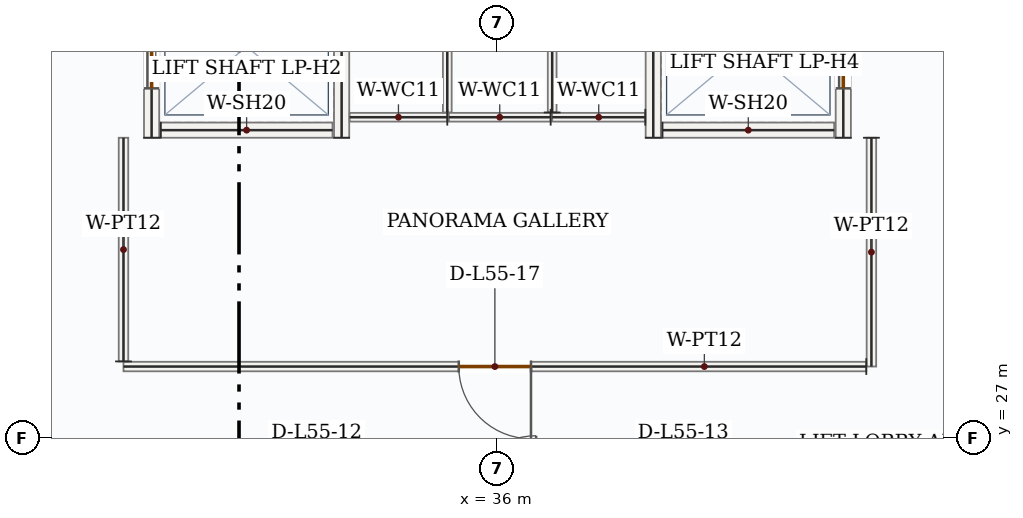
"""IFC4 building model, lengths in metres.
Left out: names, types, materials, properties, quantities, classifications, styles, units other than length and angle.
Written with IfcOpenShell. Run it as: python <this file> out.ifc"""

import sys

from ifc_helpers import new_model, si_unit, direction, frame, frame_2d, origin, place, context, subcontext, project, spatial, rectangle, extrude, source, transform, mapped, element, fill, save


model = new_model("IFC4")
c1 = context("Model", 3, precision=1e-05, world=origin(), true_north=direction((0.0, 1.0)))
c2 = subcontext(c1, "Body", "Model", "MODEL_VIEW")
j1 = project(units=[si_unit("LENGTHUNIT", "METRE"), si_unit("PLANEANGLEUNIT", "RADIAN")], contexts=[c1])
p1 = place(None, origin())
s1 = spatial("IfcSite", under=j1, at=p1, CompositionType="ELEMENT")
p2 = place(p1, origin())
s2 = spatial("IfcBuilding", under=s1, at=p2, CompositionType="ELEMENT")
p3 = place(p2, frame((0.0, 0.0, 234.3)))
s3 = spatial("IfcBuildingStorey", under=s2, at=p3, CompositionType="ELEMENT", Elevation=234.3)
p4 = place(p3, frame((31.45, 30.95, 0.0), z_axis=(0.0, 0.0, 1.0), x_axis=(0.0, 1.0, 0.0)))
e1 = element("IfcWall", 1, at=p4, inside=s3, PredefinedType="SOLIDWALL", context=c2, shape_type="SweptSolid", body=[
    extrude(rectangle(XDim=2.4, YDim=0.2, at=frame_2d((1.2, 0.0))), origin(), (0.0, 0.0, 1.0), 4.55),
])
p5 = place(p4, frame((0.65, 0.0, 0.0)))
e2 = element("IfcOpeningElement", 2, at=p5, cuts=e1, PredefinedType="OPENING", context=c2, shape_type="SweptSolid", body=[
    extrude(rectangle(XDim=1.1, YDim=2.15, at=frame_2d((0.55, 1.075))), frame((0.0, 0.11, 0.0), z_axis=(0.0, -1.0, 0.0), x_axis=(1.0, 0.0, 0.0)), (0.0, 0.0, 1.0), 0.22),
])
m1 = source(origin(), c2, "Body", "SweptSolid", [
    extrude(rectangle(XDim=2.4, YDim=0.2, at=frame_2d((1.2, 0.0))), origin(), (0.0, 0.0, 1.0), 4.55),
])
p6 = place(p3, frame((33.95, 30.95, 0.0), z_axis=(0.0, 0.0, 1.0), x_axis=(0.0, 1.0, 0.0)))
e3 = element("IfcWall", 3, at=p6, inside=s3, PredefinedType="SOLIDWALL", context=c2, shape_type="MappedRepresentation", body=[
    mapped(m1, transform((0.0, 0.0, 0.0), x_axis=(1.0, 0.0, 0.0), y_axis=(0.0, 1.0, 0.0), z_axis=(0.0, 0.0, 1.0), scale=1.0)),
])
m2 = source(origin(), c2, "Body", "SweptSolid", [
    extrude(rectangle(XDim=2.26, YDim=0.2, at=frame_2d((1.13, 0.0))), origin(), (0.0, 0.0, 1.0), 4.55),
])
p7 = place(p3, frame((31.57, 31.05, 0.0), z_axis=(0.0, 0.0, 1.0), x_axis=(1.0, 0.0, 0.0)))
e4 = element("IfcWall", 4, at=p7, inside=s3, PredefinedType="SOLIDWALL", context=c2, shape_type="MappedRepresentation", body=[
    mapped(m2, transform((0.0, 0.0, 0.0), x_axis=(1.0, 0.0, 0.0), y_axis=(0.0, 1.0, 0.0), z_axis=(0.0, 0.0, 1.0), scale=1.0)),
])
p8 = place(p3, frame((38.05, 30.95, 0.0), z_axis=(0.0, 0.0, 1.0), x_axis=(0.0, 1.0, 0.0)))
e5 = element("IfcWall", 5, at=p8, inside=s3, PredefinedType="SOLIDWALL", context=c2, shape_type="MappedRepresentation", body=[
    mapped(m1, transform((0.0, 0.0, 0.0), x_axis=(1.0, 0.0, 0.0), y_axis=(0.0, 1.0, 0.0), z_axis=(0.0, 0.0, 1.0), scale=1.0)),
])
p9 = place(p3, frame((40.55, 30.95, 0.0), z_axis=(0.0, 0.0, 1.0), x_axis=(0.0, 1.0, 0.0)))
e6 = element("IfcWall", 6, at=p9, inside=s3, PredefinedType="SOLIDWALL", context=c2, shape_type="SweptSolid", body=[
    extrude(rectangle(XDim=2.4, YDim=0.2, at=frame_2d((1.2, 0.0))), origin(), (0.0, 0.0, 1.0), 4.55),
])
p10 = place(p9, frame((0.65, 0.0, 0.0)))
e7 = element("IfcOpeningElement", 7, at=p10, cuts=e6, PredefinedType="OPENING", context=c2, shape_type="SweptSolid", body=[
    extrude(rectangle(XDim=1.1, YDim=2.15, at=frame_2d((0.55, 1.075))), frame((0.0, 0.11, 0.0), z_axis=(0.0, -1.0, 0.0), x_axis=(1.0, 0.0, 0.0)), (0.0, 0.0, 1.0), 0.22),
])
p11 = place(p3, frame((38.17, 31.05, 0.0), z_axis=(0.0, 0.0, 1.0), x_axis=(1.0, 0.0, 0.0)))
e8 = element("IfcWall", 8, at=p11, inside=s3, PredefinedType="SOLIDWALL", context=c2, shape_type="MappedRepresentation", body=[
    mapped(m2, transform((0.0, 0.0, 0.0), x_axis=(1.0, 0.0, 0.0), y_axis=(0.0, 1.0, 0.0), z_axis=(0.0, 0.0, 1.0), scale=1.0)),
])
m3 = source(origin(), c2, "Body", "SweptSolid", [
    extrude(rectangle(XDim=1.225, YDim=0.115, at=frame_2d((0.613, 0.0))), origin(), (0.0, 0.0, 1.0), 4.55),
])
p12 = place(p3, frame((37.945, 31.22, 0.0), z_axis=(0.0, 0.0, 1.0), x_axis=(-1.0, 0.0, 0.0)))
e9 = element("IfcWall", 9, at=p12, inside=s3, PredefinedType="PARTITIONING", context=c2, shape_type="MappedRepresentation", body=[
    mapped(m3, transform((0.0, 0.0, 0.0), x_axis=(1.0, 0.0, 0.0), y_axis=(0.0, 1.0, 0.0), z_axis=(0.0, 0.0, 1.0), scale=1.0)),
])
m4 = source(origin(), c2, "Body", "SweptSolid", [
    extrude(rectangle(XDim=3.998, YDim=0.115, at=frame_2d((1.999, 0.0))), origin(), (0.0, 0.0, 1.0), 4.55),
])
p13 = place(p3, frame((36.72, 31.282, 0.0), z_axis=(0.0, 0.0, 1.0), x_axis=(0.0, 1.0, 0.0)))
e10 = element("IfcWall", 10, at=p13, inside=s3, PredefinedType="PARTITIONING", context=c2, shape_type="MappedRepresentation", body=[
    mapped(m4, transform((0.0, 0.0, 0.0), x_axis=(1.0, 0.0, 0.0), y_axis=(0.0, 1.0, 0.0), z_axis=(0.0, 0.0, 1.0), scale=1.0)),
])
m5 = source(origin(), c2, "Body", "SweptSolid", [
    extrude(rectangle(XDim=1.285, YDim=0.115, at=frame_2d((0.643, 0.0))), origin(), (0.0, 0.0, 1.0), 4.55),
])
p14 = place(p3, frame((35.34, 31.22, 0.0), z_axis=(0.0, 0.0, 1.0), x_axis=(-1.0, 0.0, 0.0)))
e11 = element("IfcWall", 11, at=p14, inside=s3, PredefinedType="PARTITIONING", context=c2, shape_type="MappedRepresentation", body=[
    mapped(m5, transform((0.0, 0.0, 0.0), x_axis=(1.0, 0.0, 0.0), y_axis=(0.0, 1.0, 0.0), z_axis=(0.0, 0.0, 1.0), scale=1.0)),
])
m6 = source(origin(), c2, "Body", "SweptSolid", [
    extrude(rectangle(XDim=3.935, YDim=0.115, at=frame_2d((1.968, 0.0))), origin(), (0.0, 0.0, 1.0), 4.55),
])
p15 = place(p3, frame((35.34, 35.218, 0.0), z_axis=(0.0, 0.0, 1.0), x_axis=(0.0, -1.0, 0.0)))
e12 = element("IfcWall", 12, at=p15, inside=s3, PredefinedType="PARTITIONING", context=c2, shape_type="MappedRepresentation", body=[
    mapped(m6, transform((0.0, 0.0, 0.0), x_axis=(1.0, 0.0, 0.0), y_axis=(0.0, 1.0, 0.0), z_axis=(0.0, 0.0, 1.0), scale=1.0)),
])
m7 = source(origin(), c2, "Body", "SweptSolid", [
    extrude(rectangle(XDim=1.34, YDim=0.115, at=frame_2d((0.67, 0.0))), origin(), (0.0, 0.0, 1.0), 4.55),
])
p16 = place(p3, frame((36.7, 31.22, 0.0), z_axis=(0.0, 0.0, 1.0), x_axis=(-1.0, 0.0, 0.0)))
e13 = element("IfcWall", 13, at=p16, inside=s3, PredefinedType="PARTITIONING", context=c2, shape_type="MappedRepresentation", body=[
    mapped(m7, transform((0.0, 0.0, 0.0), x_axis=(1.0, 0.0, 0.0), y_axis=(0.0, 1.0, 0.0), z_axis=(0.0, 0.0, 1.0), scale=1.0)),
])
m8 = source(origin(), c2, "Body", "SweptSolid", [
    extrude(rectangle(XDim=3.01, YDim=0.125, at=frame_2d((1.505, 0.0))), origin(), (0.0, 0.0, 1.0), 4.55),
])
p17 = place(p3, frame((40.92, 30.95, 0.0), z_axis=(0.0, 0.0, 1.0), x_axis=(0.0, -1.0, 0.0)))
e14 = element("IfcWall", 14, at=p17, inside=s3, PredefinedType="PARTITIONING", context=c2, shape_type="MappedRepresentation", body=[
    mapped(m8, transform((0.0, 0.0, 0.0), x_axis=(1.0, 0.0, 0.0), y_axis=(0.0, 1.0, 0.0), z_axis=(0.0, 0.0, 1.0), scale=1.0)),
])
p18 = place(p3, frame((40.853, 27.94, 0.0), z_axis=(0.0, 0.0, 1.0), x_axis=(-1.0, 0.0, 0.0)))
e15 = element("IfcWall", 15, at=p18, inside=s3, PredefinedType="PARTITIONING", context=c2, shape_type="SweptSolid", body=[
    extrude(rectangle(XDim=9.772, YDim=0.125, at=frame_2d((4.886, 0.0))), origin(), (0.0, 0.0, 1.0), 4.55),
])
p19 = place(p18, frame((4.411, 0.0, 0.0)))
e16 = element("IfcOpeningElement", 16, at=p19, cuts=e15, PredefinedType="OPENING", context=c2, shape_type="SweptSolid", body=[
    extrude(rectangle(XDim=0.95, YDim=2.15, at=frame_2d((0.475, 1.075))), frame((0.0, 0.073, 0.0), z_axis=(0.0, -1.0, 0.0), x_axis=(1.0, 0.0, 0.0)), (0.0, 0.0, 1.0), 0.145),
])
m9 = source(origin(), c2, "Body", "SweptSolid", [
    extrude(rectangle(XDim=2.942, YDim=0.125, at=frame_2d((1.471, 0.0))), origin(), (0.0, 0.0, 1.0), 4.55),
])
p20 = place(p3, frame((31.08, 28.008, 0.0), z_axis=(0.0, 0.0, 1.0), x_axis=(0.0, 1.0, 0.0)))
e17 = element("IfcWall", 17, at=p20, inside=s3, PredefinedType="PARTITIONING", context=c2, shape_type="MappedRepresentation", body=[
    mapped(m9, transform((0.0, 0.0, 0.0), x_axis=(1.0, 0.0, 0.0), y_axis=(0.0, 1.0, 0.0), z_axis=(0.0, 0.0, 1.0), scale=1.0)),
])
m10 = source(origin(), c2, "Body", "SweptSolid", [
    extrude(rectangle(XDim=1.1, YDim=2.15, at=frame_2d((0.55, 1.075))), frame((0.0, 0.025, 0.0), z_axis=(0.0, -1.0, 0.0), x_axis=(1.0, 0.0, 0.0)), (0.0, 0.0, 1.0), 0.05),
])
p21 = place(p5, origin())
e18 = element("IfcDoor", 18, at=p21, inside=s3, OperationType="DOUBLE_DOOR_SLIDING", PredefinedType="DOOR", context=c2, shape_type="MappedRepresentation", body=[
    mapped(m10, transform((0.0, 0.0, 0.0), x_axis=(1.0, 0.0, 0.0), y_axis=(0.0, 1.0, 0.0), z_axis=(0.0, 0.0, 1.0), scale=1.0)),
])
fill(e2, e18)
p22 = place(p10, origin())
e19 = element("IfcDoor", 19, at=p22, inside=s3, OperationType="DOUBLE_DOOR_SLIDING", PredefinedType="DOOR", context=c2, shape_type="MappedRepresentation", body=[
    mapped(m10, transform((0.0, 0.0, 0.0), x_axis=(1.0, 0.0, 0.0), y_axis=(0.0, 1.0, 0.0), z_axis=(0.0, 0.0, 1.0), scale=1.0)),
])
fill(e7, e19)
m11 = source(origin(), c2, "Body", "SweptSolid", [
    extrude(rectangle(XDim=0.95, YDim=2.15, at=frame_2d((0.475, 1.075))), frame((0.0, 0.025, 0.0), z_axis=(0.0, -1.0, 0.0), x_axis=(1.0, 0.0, 0.0)), (0.0, 0.0, 1.0), 0.05),
])
p23 = place(p19, origin())
e20 = element("IfcDoor", 20, at=p23, inside=s3, OperationType="SINGLE_SWING_LEFT", PredefinedType="DOOR", context=c2, shape_type="MappedRepresentation", body=[
    mapped(m11, transform((0.0, 0.0, 0.0), x_axis=(1.0, 0.0, 0.0), y_axis=(0.0, 1.0, 0.0), z_axis=(0.0, 0.0, 1.0), scale=1.0)),
])
fill(e16, e20)
save(model, sys.argv[1])
